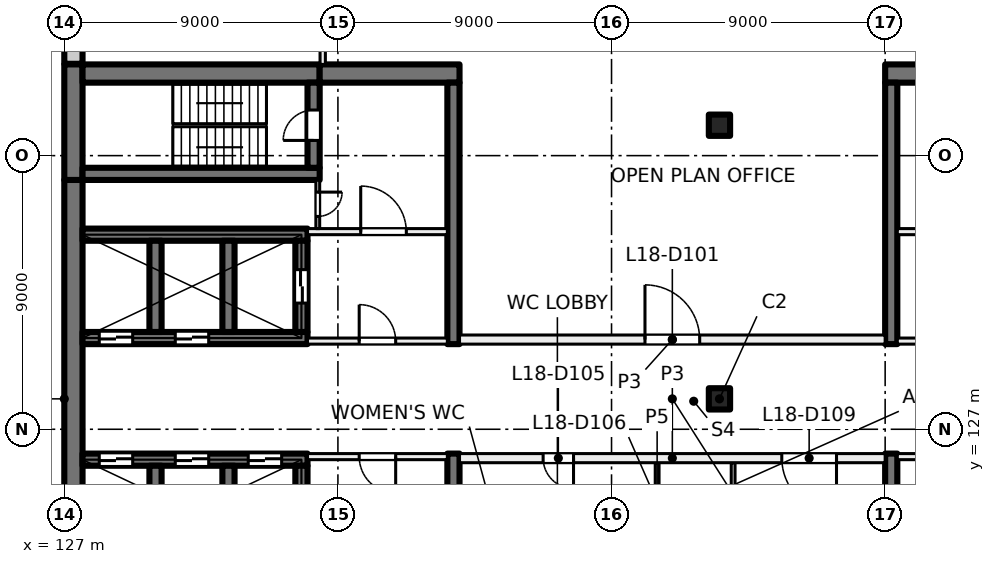
"""IFC4 building model, lengths in metres.
Left out: names, types, materials, properties, quantities, classifications, styles, units other than length and angle.
Written with IfcOpenShell. Run it as: python <this file> out.ifc"""

import sys

from ifc_helpers import new_model, si_unit, direction, frame, frame_2d, origin, origin_2d, place, context, subcontext, project, spatial, rectangle, extrude, element, fill, save


model = new_model("IFC4")
c1 = context("Model", 3, precision=1e-05, world=origin(), true_north=direction((0.0, 1.0)))
c2 = subcontext(c1, "Body", "Model", "MODEL_VIEW")
j1 = project(units=[si_unit("LENGTHUNIT", "METRE"), si_unit("PLANEANGLEUNIT", "RADIAN")], contexts=[c1])
p1 = place(None, origin())
s1 = spatial("IfcSite", under=j1, at=p1, CompositionType="ELEMENT")
p2 = place(p1, origin())
s2 = spatial("IfcBuilding", under=s1, at=p2, CompositionType="ELEMENT")
p3 = place(p2, frame((0.0, 0.0, 81.0)))
s3 = spatial("IfcBuildingStorey", under=s2, at=p3, CompositionType="ELEMENT", Elevation=81.0)
for number, where, z_axis, x_axis in (
    (1, (148.55, 128.0, 0.0), (0.0, 0.0, 1.0), (1.0, 0.0, 0.0)),
    (2, (148.55, 137.0, 0.0), (0.0, 0.0, 1.0), (1.0, 0.0, 0.0)),
):
    element("IfcColumn", number, at=place(p3, frame(where, z_axis=z_axis, x_axis=x_axis)), inside=s3, PredefinedType="COLUMN", context=c2, shape_type="SweptSolid", body=[
        extrude(rectangle(XDim=0.7, YDim=0.7, at=origin_2d()), origin(), (0.0, 0.0, 1.0), 4.0),
    ])
p4 = place(p3, frame((127.3, 120.8, 0.0), z_axis=(0.0, 0.0, 1.0), x_axis=(0.0, 1.0, 0.0)))
e3 = element("IfcWall", 3, at=p4, inside=s3, PredefinedType="SHEAR", context=c2, shape_type="SweptSolid", body=[
    extrude(rectangle(XDim=14.4, YDim=0.6, at=frame_2d((7.2, 0.0))), origin(), (0.0, 0.0, 1.0), 4.0),
])
p5 = place(p3, frame((127.3, 135.2, 0.0), z_axis=(0.0, 0.0, 1.0), x_axis=(0.0, 1.0, 0.0)))
e4 = element("IfcWall", 4, at=p5, inside=s3, PredefinedType="SHEAR", context=c2, shape_type="SweptSolid", body=[
    extrude(rectangle(XDim=3.8, YDim=0.6, at=frame_2d((1.9, 0.0))), origin(), (0.0, 0.0, 1.0), 4.0),
])
p6 = place(p3, frame((127.6, 138.7, 0.0), z_axis=(0.0, 0.0, 1.0), x_axis=(1.0, 0.0, 0.0)))
e5 = element("IfcWall", 5, at=p6, inside=s3, PredefinedType="SHEAR", context=c2, shape_type="SweptSolid", body=[
    extrude(rectangle(XDim=7.8, YDim=0.6, at=frame_2d((3.9, 0.0))), origin(), (0.0, 0.0, 1.0), 4.0),
])
p7 = place(p3, frame((135.4, 138.7, 0.0), z_axis=(0.0, 0.0, 1.0), x_axis=(1.0, 0.0, 0.0)))
e6 = element("IfcWall", 6, at=p7, inside=s3, PredefinedType="SHEAR", context=c2, shape_type="SweptSolid", body=[
    extrude(rectangle(XDim=4.6, YDim=0.6, at=frame_2d((2.3, 0.0))), origin(), (0.0, 0.0, 1.0), 4.0),
])
p8 = place(p3, frame((127.6, 135.4, 0.0), z_axis=(0.0, 0.0, 1.0), x_axis=(1.0, 0.0, 0.0)))
e7 = element("IfcWall", 7, at=p8, inside=s3, PredefinedType="SHEAR", context=c2, shape_type="SweptSolid", body=[
    extrude(rectangle(XDim=7.8, YDim=0.4, at=frame_2d((3.9, 0.0))), origin(), (0.0, 0.0, 1.0), 4.0),
])
p9 = place(p3, frame((135.2, 135.6, 0.0), z_axis=(0.0, 0.0, 1.0), x_axis=(0.0, 1.0, 0.0)))
e8 = element("IfcWall", 8, at=p9, inside=s3, PredefinedType="SHEAR", context=c2, shape_type="SweptSolid", body=[
    extrude(rectangle(XDim=2.8, YDim=0.4, at=frame_2d((1.4, 0.0))), origin(), (0.0, 0.0, 1.0), 4.0),
])
p10 = place(p9, frame((0.9, 0.0, 0.0)))
e9 = element("IfcOpeningElement", 9, at=p10, cuts=e8, PredefinedType="OPENING", context=c2, shape_type="SweptSolid", body=[
    extrude(rectangle(XDim=1.0, YDim=2.1, at=frame_2d((0.5, 1.05))), frame((0.0, 0.21, 0.0), z_axis=(0.0, -1.0, 0.0), x_axis=(1.0, 0.0, 0.0)), (0.0, 0.0, 1.0), 0.42),
])
p11 = place(p3, frame((127.6, 126.0, 0.0), z_axis=(0.0, 0.0, 1.0), x_axis=(1.0, 0.0, 0.0)))
e10 = element("IfcWall", 10, at=p11, inside=s3, PredefinedType="SHEAR", context=c2, shape_type="SweptSolid", body=[
    extrude(rectangle(XDim=7.4, YDim=0.4, at=frame_2d((3.7, 0.0))), origin(), (0.0, 0.0, 1.0), 4.0),
])
p12 = place(p11, frame((0.55, 0.0, 0.0)))
e11 = element("IfcOpeningElement", 11, at=p12, cuts=e10, PredefinedType="OPENING", context=c2, shape_type="SweptSolid", body=[
    extrude(rectangle(XDim=1.1, YDim=2.1, at=frame_2d((0.55, 1.05))), frame((0.0, 0.21, 0.0), z_axis=(0.0, -1.0, 0.0), x_axis=(1.0, 0.0, 0.0)), (0.0, 0.0, 1.0), 0.42),
])
p13 = place(p11, frame((3.05, 0.0, 0.0)))
e12 = element("IfcOpeningElement", 12, at=p13, cuts=e10, PredefinedType="OPENING", context=c2, shape_type="SweptSolid", body=[
    extrude(rectangle(XDim=1.1, YDim=2.1, at=frame_2d((0.55, 1.05))), frame((0.0, 0.21, 0.0), z_axis=(0.0, -1.0, 0.0), x_axis=(1.0, 0.0, 0.0)), (0.0, 0.0, 1.0), 0.42),
])
p14 = place(p11, frame((5.45, 0.0, 0.0)))
e13 = element("IfcOpeningElement", 13, at=p14, cuts=e10, PredefinedType="OPENING", context=c2, shape_type="SweptSolid", body=[
    extrude(rectangle(XDim=1.1, YDim=2.1, at=frame_2d((0.55, 1.05))), frame((0.0, 0.21, 0.0), z_axis=(0.0, -1.0, 0.0), x_axis=(1.0, 0.0, 0.0)), (0.0, 0.0, 1.0), 0.42),
])
for number, where, z_axis, x_axis in (
    (14, (130.0, 122.8, 0.0), (0.0, 0.0, 1.0), (0.0, 1.0, 0.0)),
    (15, (132.4, 122.8, 0.0), (0.0, 0.0, 1.0), (0.0, 1.0, 0.0)),
    (16, (134.8, 122.8, 0.0), (0.0, 0.0, 1.0), (0.0, 1.0, 0.0)),
):
    element("IfcWall", number, at=place(p3, frame(where, z_axis=z_axis, x_axis=x_axis)), inside=s3, PredefinedType="SHEAR", context=c2, shape_type="SweptSolid", body=[
        extrude(rectangle(XDim=3.0, YDim=0.4, at=frame_2d((1.5, 0.0))), origin(), (0.0, 0.0, 1.0), 4.0),
    ])
p15 = place(p3, frame((127.6, 130.0, 0.0), z_axis=(0.0, 0.0, 1.0), x_axis=(1.0, 0.0, 0.0)))
e17 = element("IfcWall", 17, at=p15, inside=s3, PredefinedType="SHEAR", context=c2, shape_type="SweptSolid", body=[
    extrude(rectangle(XDim=7.4, YDim=0.4, at=frame_2d((3.7, 0.0))), origin(), (0.0, 0.0, 1.0), 4.0),
])
p16 = place(p15, frame((0.55, 0.0, 0.0)))
e18 = element("IfcOpeningElement", 18, at=p16, cuts=e17, PredefinedType="OPENING", context=c2, shape_type="SweptSolid", body=[
    extrude(rectangle(XDim=1.1, YDim=2.1, at=frame_2d((0.55, 1.05))), frame((0.0, 0.21, 0.0), z_axis=(0.0, -1.0, 0.0), x_axis=(1.0, 0.0, 0.0)), (0.0, 0.0, 1.0), 0.42),
])
p17 = place(p15, frame((3.05, 0.0, 0.0)))
e19 = element("IfcOpeningElement", 19, at=p17, cuts=e17, PredefinedType="OPENING", context=c2, shape_type="SweptSolid", body=[
    extrude(rectangle(XDim=1.1, YDim=2.1, at=frame_2d((0.55, 1.05))), frame((0.0, 0.21, 0.0), z_axis=(0.0, -1.0, 0.0), x_axis=(1.0, 0.0, 0.0)), (0.0, 0.0, 1.0), 0.42),
])
p18 = place(p3, frame((127.6, 133.4, 0.0), z_axis=(0.0, 0.0, 1.0), x_axis=(1.0, 0.0, 0.0)))
e20 = element("IfcWall", 20, at=p18, inside=s3, PredefinedType="SHEAR", context=c2, shape_type="SweptSolid", body=[
    extrude(rectangle(XDim=7.4, YDim=0.4, at=frame_2d((3.7, 0.0))), origin(), (0.0, 0.0, 1.0), 4.0),
])
for number, where, z_axis, x_axis in (
    (21, (130.0, 130.2, 0.0), (0.0, 0.0, 1.0), (0.0, 1.0, 0.0)),
    (22, (132.4, 130.2, 0.0), (0.0, 0.0, 1.0), (0.0, 1.0, 0.0)),
):
    element("IfcWall", number, at=place(p3, frame(where, z_axis=z_axis, x_axis=x_axis)), inside=s3, PredefinedType="SHEAR", context=c2, shape_type="SweptSolid", body=[
        extrude(rectangle(XDim=3.0, YDim=0.4, at=frame_2d((1.5, 0.0))), origin(), (0.0, 0.0, 1.0), 4.0),
    ])
p19 = place(p3, frame((134.8, 130.2, 0.0), z_axis=(0.0, 0.0, 1.0), x_axis=(0.0, 1.0, 0.0)))
e23 = element("IfcWall", 23, at=p19, inside=s3, PredefinedType="SHEAR", context=c2, shape_type="SweptSolid", body=[
    extrude(rectangle(XDim=3.0, YDim=0.4, at=frame_2d((1.5, 0.0))), origin(), (0.0, 0.0, 1.0), 4.0),
])
p20 = place(p19, frame((0.95, 0.0, 0.0)))
e24 = element("IfcOpeningElement", 24, at=p20, cuts=e23, PredefinedType="OPENING", context=c2, shape_type="SweptSolid", body=[
    extrude(rectangle(XDim=1.1, YDim=2.1, at=frame_2d((0.55, 1.05))), frame((0.0, 0.21, 0.0), z_axis=(0.0, -1.0, 0.0), x_axis=(1.0, 0.0, 0.0)), (0.0, 0.0, 1.0), 0.42),
])
for number, where, z_axis, x_axis in (
    (25, (139.8, 117.6, 0.0), (0.0, 0.0, 1.0), (0.0, 1.0, 0.0)),
    (26, (139.8, 129.8, 0.0), (0.0, 0.0, 1.0), (0.0, 1.0, 0.0)),
):
    element("IfcWall", number, at=place(p3, frame(where, z_axis=z_axis, x_axis=x_axis)), inside=s3, PredefinedType="SHEAR", context=c2, shape_type="SweptSolid", body=[
        extrude(rectangle(XDim=8.6, YDim=0.4, at=frame_2d((4.3, 0.0))), origin(), (0.0, 0.0, 1.0), 4.0),
    ])
p21 = place(p3, frame((158.6, 138.7, 0.0), z_axis=(0.0, 0.0, 1.0), x_axis=(-1.0, 0.0, 0.0)))
e27 = element("IfcWall", 27, at=p21, inside=s3, PredefinedType="SHEAR", context=c2, shape_type="SweptSolid", body=[
    extrude(rectangle(XDim=4.6, YDim=0.6, at=frame_2d((2.3, 0.0))), origin(), (0.0, 0.0, 1.0), 4.0),
])
for number, where, z_axis, x_axis in (
    (28, (154.2, 138.4, 0.0), (0.0, 0.0, 1.0), (0.0, -1.0, 0.0)),
    (29, (154.2, 126.2, 0.0), (0.0, 0.0, 1.0), (0.0, -1.0, 0.0)),
):
    element("IfcWall", number, at=place(p3, frame(where, z_axis=z_axis, x_axis=x_axis)), inside=s3, PredefinedType="SHEAR", context=c2, shape_type="SweptSolid", body=[
        extrude(rectangle(XDim=8.6, YDim=0.4, at=frame_2d((4.3, 0.0))), origin(), (0.0, 0.0, 1.0), 4.0),
    ])
p22 = place(p3, frame((127.3, 139.02, 0.0), z_axis=(0.0, 0.0, 1.0), x_axis=(0.0, 1.0, 0.0)))
e30 = element("IfcWall", 30, at=p22, inside=s3, PredefinedType="SOLIDWALL", context=c2, shape_type="SweptSolid", body=[
    extrude(rectangle(XDim=2.98, YDim=0.6, at=frame_2d((1.49, 0.0))), origin(), (0.0, 0.0, 1.0), 3.625),
])
p23 = place(p3, frame((135.0, 129.9, 0.0), z_axis=(0.0, 0.0, 1.0), x_axis=(1.0, 0.0, 0.0)))
e31 = element("IfcWall", 31, at=p23, inside=s3, PredefinedType="PARTITIONING", context=c2, shape_type="SweptSolid", body=[
    extrude(rectangle(XDim=4.6, YDim=0.2, at=frame_2d((2.3, 0.0))), origin(), (0.0, 0.0, 1.0), 3.625),
])
p24 = place(p23, frame((1.7, 0.0, 0.0)))
e32 = element("IfcOpeningElement", 32, at=p24, cuts=e31, PredefinedType="OPENING", context=c2, shape_type="SweptSolid", body=[
    extrude(rectangle(XDim=1.2, YDim=2.1, at=frame_2d((0.6, 1.05))), frame((0.0, 0.11, 0.0), z_axis=(0.0, -1.0, 0.0), x_axis=(1.0, 0.0, 0.0)), (0.0, 0.0, 1.0), 0.22),
])
p25 = place(p3, frame((135.0, 133.5, 0.0), z_axis=(0.0, 0.0, 1.0), x_axis=(1.0, 0.0, 0.0)))
e33 = element("IfcWall", 33, at=p25, inside=s3, PredefinedType="PARTITIONING", context=c2, shape_type="SweptSolid", body=[
    extrude(rectangle(XDim=4.6, YDim=0.2, at=frame_2d((2.3, 0.0))), origin(), (0.0, 0.0, 1.0), 3.625),
])
p26 = place(p25, frame((1.75, 0.0, 0.0)))
e34 = element("IfcOpeningElement", 34, at=p26, cuts=e33, PredefinedType="OPENING", context=c2, shape_type="SweptSolid", body=[
    extrude(rectangle(XDim=1.5, YDim=2.1, at=frame_2d((0.75, 1.05))), frame((0.0, 0.11, 0.0), z_axis=(0.0, -1.0, 0.0), x_axis=(1.0, 0.0, 0.0)), (0.0, 0.0, 1.0), 0.22),
])
p27 = place(p3, frame((135.337, 135.2, 0.0), z_axis=(0.0, 0.0, 1.0), x_axis=(0.0, -1.0, 0.0)))
e35 = element("IfcWall", 35, at=p27, inside=s3, PredefinedType="PARTITIONING", context=c2, shape_type="SweptSolid", body=[
    extrude(rectangle(XDim=1.6, YDim=0.125, at=frame_2d((0.8, 0.0))), origin(), (0.0, 0.0, 1.0), 3.625),
])
p28 = place(p27, frame((0.4, 0.0, 0.0)))
e36 = element("IfcOpeningElement", 36, at=p28, cuts=e35, PredefinedType="OPENING", context=c2, shape_type="SweptSolid", body=[
    extrude(rectangle(XDim=0.8, YDim=2.1, at=frame_2d((0.4, 1.05))), frame((0.0, 0.073, 0.0), z_axis=(0.0, -1.0, 0.0), x_axis=(1.0, 0.0, 0.0)), (0.0, 0.0, 1.0), 0.145),
])
p29 = place(p3, frame((139.6, 126.1, 0.0), z_axis=(0.0, 0.0, 1.0), x_axis=(-1.0, 0.0, 0.0)))
e37 = element("IfcWall", 37, at=p29, inside=s3, PredefinedType="PARTITIONING", context=c2, shape_type="SweptSolid", body=[
    extrude(rectangle(XDim=4.6, YDim=0.2, at=frame_2d((2.3, 0.0))), origin(), (0.0, 0.0, 1.0), 3.625),
])
p30 = place(p29, frame((1.7, 0.0, 0.0)))
e38 = element("IfcOpeningElement", 38, at=p30, cuts=e37, PredefinedType="OPENING", context=c2, shape_type="SweptSolid", body=[
    extrude(rectangle(XDim=1.2, YDim=2.1, at=frame_2d((0.6, 1.05))), frame((0.0, 0.11, 0.0), z_axis=(0.0, -1.0, 0.0), x_axis=(1.0, 0.0, 0.0)), (0.0, 0.0, 1.0), 0.22),
])
p31 = place(p3, frame((163.8, 126.1, 0.0), z_axis=(0.0, 0.0, 1.0), x_axis=(-1.0, 0.0, 0.0)))
e39 = element("IfcWall", 39, at=p31, inside=s3, PredefinedType="PARTITIONING", context=c2, shape_type="SweptSolid", body=[
    extrude(rectangle(XDim=9.4, YDim=0.2, at=frame_2d((4.7, 0.0))), origin(), (0.0, 0.0, 1.0), 3.625),
])
p32 = place(p31, frame((4.1, 0.0, 0.0)))
e40 = element("IfcOpeningElement", 40, at=p32, cuts=e39, PredefinedType="OPENING", context=c2, shape_type="SweptSolid", body=[
    extrude(rectangle(XDim=1.2, YDim=2.1, at=frame_2d((0.6, 1.05))), frame((0.0, 0.11, 0.0), z_axis=(0.0, -1.0, 0.0), x_axis=(1.0, 0.0, 0.0)), (0.0, 0.0, 1.0), 0.22),
])
p33 = place(p3, frame((154.4, 129.9, 0.0), z_axis=(0.0, 0.0, 1.0), x_axis=(1.0, 0.0, 0.0)))
e41 = element("IfcWall", 41, at=p33, inside=s3, PredefinedType="PARTITIONING", context=c2, shape_type="SweptSolid", body=[
    extrude(rectangle(XDim=9.4, YDim=0.2, at=frame_2d((4.7, 0.0))), origin(), (0.0, 0.0, 1.0), 3.625),
])
p34 = place(p33, frame((4.1, 0.0, 0.0)))
e42 = element("IfcOpeningElement", 42, at=p34, cuts=e41, PredefinedType="OPENING", context=c2, shape_type="SweptSolid", body=[
    extrude(rectangle(XDim=1.2, YDim=2.1, at=frame_2d((0.6, 1.05))), frame((0.0, 0.11, 0.0), z_axis=(0.0, -1.0, 0.0), x_axis=(1.0, 0.0, 0.0)), (0.0, 0.0, 1.0), 0.22),
])
p35 = place(p3, frame((154.4, 133.5, 0.0), z_axis=(0.0, 0.0, 1.0), x_axis=(1.0, 0.0, 0.0)))
e43 = element("IfcWall", 43, at=p35, inside=s3, PredefinedType="PARTITIONING", context=c2, shape_type="SweptSolid", body=[
    extrude(rectangle(XDim=9.4, YDim=0.2, at=frame_2d((4.7, 0.0))), origin(), (0.0, 0.0, 1.0), 3.625),
])
p36 = place(p35, frame((1.35, 0.0, 0.0)))
e44 = element("IfcOpeningElement", 44, at=p36, cuts=e43, PredefinedType="OPENING", context=c2, shape_type="SweptSolid", body=[
    extrude(rectangle(XDim=1.5, YDim=2.1, at=frame_2d((0.75, 1.05))), frame((0.0, 0.11, 0.0), z_axis=(0.0, -1.0, 0.0), x_axis=(1.0, 0.0, 0.0)), (0.0, 0.0, 1.0), 0.22),
])
p37 = place(p3, frame((135.5, 145.4, 0.0), z_axis=(0.0, 0.0, 1.0), x_axis=(0.0, -1.0, 0.0)))
e45 = element("IfcWall", 45, at=p37, inside=s3, PredefinedType="PARTITIONING", context=c2, shape_type="SweptSolid", body=[
    extrude(rectangle(XDim=6.4, YDim=0.175, at=frame_2d((3.2, 0.0))), origin(), (0.0, 0.0, 1.0), 3.625),
])
p38 = place(p37, frame((2.6, 0.0, 0.0)))
e46 = element("IfcOpeningElement", 46, at=p38, cuts=e45, PredefinedType="OPENING", context=c2, shape_type="SweptSolid", body=[
    extrude(rectangle(XDim=1.2, YDim=2.1, at=frame_2d((0.6, 1.05))), frame((0.0, 0.097, 0.0), z_axis=(0.0, -1.0, 0.0), x_axis=(1.0, 0.0, 0.0)), (0.0, 0.0, 1.0), 0.195),
])
p39 = place(p3, frame((140.0, 129.95, 0.0), z_axis=(0.0, 0.0, 1.0), x_axis=(1.0, 0.0, 0.0)))
e47 = element("IfcWall", 47, at=p39, inside=s3, PredefinedType="PARTITIONING", context=c2, shape_type="SweptSolid", body=[
    extrude(rectangle(XDim=14.0, YDim=0.3, at=frame_2d((7.0, 0.0))), origin(), (0.0, 0.0, 1.0), 3.625),
])
p40 = place(p39, frame((6.1, 0.0, 0.0)))
e48 = element("IfcOpeningElement", 48, at=p40, cuts=e47, PredefinedType="OPENING", context=c2, shape_type="SweptSolid", body=[
    extrude(rectangle(XDim=1.8, YDim=2.1, at=frame_2d((0.9, 1.05))), frame((0.0, 0.16, 0.0), z_axis=(0.0, -1.0, 0.0), x_axis=(1.0, 0.0, 0.0)), (0.0, 0.0, 1.0), 0.32),
])
p41 = place(p3, frame((146.5, 125.9, 0.0), z_axis=(0.0, 0.0, 1.0), x_axis=(0.0, -1.0, 0.0)))
e49 = element("IfcWall", 49, at=p41, inside=s3, PredefinedType="PARTITIONING", context=c2, shape_type="SweptSolid", body=[
    extrude(rectangle(XDim=2.588, YDim=0.125, at=frame_2d((1.294, 0.0))), origin(), (0.0, 0.0, 1.0), 3.625),
])
p42 = place(p41, frame((0.794, 0.0, 0.0)))
e50 = element("IfcOpeningElement", 50, at=p42, cuts=e49, PredefinedType="OPENING", context=c2, shape_type="SweptSolid", body=[
    extrude(rectangle(XDim=1.0, YDim=2.1, at=frame_2d((0.5, 1.05))), frame((0.0, 0.073, 0.0), z_axis=(0.0, -1.0, 0.0), x_axis=(1.0, 0.0, 0.0)), (0.0, 0.0, 1.0), 0.145),
])
p43 = place(p3, frame((149.0, 116.988, 0.0), z_axis=(0.0, 0.0, 1.0), x_axis=(0.0, 1.0, 0.0)))
e51 = element("IfcWall", 51, at=p43, inside=s3, PredefinedType="PARTITIONING", context=c2, shape_type="SweptSolid", body=[
    extrude(rectangle(XDim=8.912, YDim=0.125, at=frame_2d((4.456, 0.0))), origin(), (0.0, 0.0, 1.0), 3.625),
])
p44 = place(p3, frame((154.0, 126.05, 0.0), z_axis=(0.0, 0.0, 1.0), x_axis=(-1.0, 0.0, 0.0)))
e52 = element("IfcWall", 52, at=p44, inside=s3, PredefinedType="PARTITIONING", context=c2, shape_type="SweptSolid", body=[
    extrude(rectangle(XDim=14.0, YDim=0.3, at=frame_2d((7.0, 0.0))), origin(), (0.0, 0.0, 1.0), 3.625),
])
p45 = place(p44, frame((10.25, 0.0, 0.0)))
e53 = element("IfcOpeningElement", 53, at=p45, cuts=e52, PredefinedType="OPENING", context=c2, shape_type="SweptSolid", body=[
    extrude(rectangle(XDim=1.0, YDim=2.1, at=frame_2d((0.5, 1.05))), frame((0.0, 0.16, 0.0), z_axis=(0.0, -1.0, 0.0), x_axis=(1.0, 0.0, 0.0)), (0.0, 0.0, 1.0), 0.32),
])
p46 = place(p44, frame((1.6, 0.0, 0.0)))
e54 = element("IfcOpeningElement", 54, at=p46, cuts=e52, PredefinedType="OPENING", context=c2, shape_type="SweptSolid", body=[
    extrude(rectangle(XDim=1.8, YDim=2.1, at=frame_2d((0.9, 1.05))), frame((0.0, 0.16, 0.0), z_axis=(0.0, -1.0, 0.0), x_axis=(1.0, 0.0, 0.0)), (0.0, 0.0, 1.0), 0.32),
])
p47 = place(p16, origin())
e55 = element("IfcDoor", 55, at=p47, inside=s3, OperationType="DOUBLE_DOOR_SLIDING", PredefinedType="DOOR", context=c2, shape_type="SweptSolid", body=[
    extrude(rectangle(XDim=1.1, YDim=2.1, at=frame_2d((0.55, 1.05))), frame((0.0, 0.025, 0.0), z_axis=(0.0, -1.0, 0.0), x_axis=(1.0, 0.0, 0.0)), (0.0, 0.0, 1.0), 0.05),
])
fill(e18, e55)
p48 = place(p17, origin())
e56 = element("IfcDoor", 56, at=p48, inside=s3, OperationType="DOUBLE_DOOR_SLIDING", PredefinedType="DOOR", context=c2, shape_type="SweptSolid", body=[
    extrude(rectangle(XDim=1.1, YDim=2.1, at=frame_2d((0.55, 1.05))), frame((0.0, 0.025, 0.0), z_axis=(0.0, -1.0, 0.0), x_axis=(1.0, 0.0, 0.0)), (0.0, 0.0, 1.0), 0.05),
])
fill(e19, e56)
p49 = place(p12, origin())
e57 = element("IfcDoor", 57, at=p49, inside=s3, OperationType="DOUBLE_DOOR_SLIDING", PredefinedType="DOOR", context=c2, shape_type="SweptSolid", body=[
    extrude(rectangle(XDim=1.1, YDim=2.1, at=frame_2d((0.55, 1.05))), frame((0.0, 0.025, 0.0), z_axis=(0.0, -1.0, 0.0), x_axis=(1.0, 0.0, 0.0)), (0.0, 0.0, 1.0), 0.05),
])
fill(e11, e57)
p50 = place(p13, origin())
e58 = element("IfcDoor", 58, at=p50, inside=s3, OperationType="DOUBLE_DOOR_SLIDING", PredefinedType="DOOR", context=c2, shape_type="SweptSolid", body=[
    extrude(rectangle(XDim=1.1, YDim=2.1, at=frame_2d((0.55, 1.05))), frame((0.0, 0.025, 0.0), z_axis=(0.0, -1.0, 0.0), x_axis=(1.0, 0.0, 0.0)), (0.0, 0.0, 1.0), 0.05),
])
fill(e12, e58)
p51 = place(p14, origin())
e59 = element("IfcDoor", 59, at=p51, inside=s3, OperationType="DOUBLE_DOOR_SLIDING", PredefinedType="DOOR", context=c2, shape_type="SweptSolid", body=[
    extrude(rectangle(XDim=1.1, YDim=2.1, at=frame_2d((0.55, 1.05))), frame((0.0, 0.025, 0.0), z_axis=(0.0, -1.0, 0.0), x_axis=(1.0, 0.0, 0.0)), (0.0, 0.0, 1.0), 0.05),
])
fill(e13, e59)
p52 = place(p24, origin())
e60 = element("IfcDoor", 60, at=p52, inside=s3, OperationType="DOUBLE_DOOR_SINGLE_SWING", PredefinedType="DOOR", context=c2, shape_type="SweptSolid", body=[
    extrude(rectangle(XDim=1.2, YDim=2.1, at=frame_2d((0.6, 1.05))), frame((0.0, 0.025, 0.0), z_axis=(0.0, -1.0, 0.0), x_axis=(1.0, 0.0, 0.0)), (0.0, 0.0, 1.0), 0.05),
])
fill(e32, e60)
p53 = place(p26, origin())
e61 = element("IfcDoor", 61, at=p53, inside=s3, OperationType="DOUBLE_DOOR_SINGLE_SWING", PredefinedType="DOOR", context=c2, shape_type="SweptSolid", body=[
    extrude(rectangle(XDim=1.5, YDim=2.1, at=frame_2d((0.75, 1.05))), frame((0.0, 0.025, 0.0), z_axis=(0.0, -1.0, 0.0), x_axis=(1.0, 0.0, 0.0)), (0.0, 0.0, 1.0), 0.05),
])
fill(e34, e61)
p54 = place(p10, origin())
e62 = element("IfcDoor", 62, at=p54, inside=s3, OperationType="SINGLE_SWING_LEFT", PredefinedType="DOOR", context=c2, shape_type="SweptSolid", body=[
    extrude(rectangle(XDim=1.0, YDim=2.1, at=frame_2d((0.5, 1.05))), frame((0.0, 0.025, 0.0), z_axis=(0.0, -1.0, 0.0), x_axis=(1.0, 0.0, 0.0)), (0.0, 0.0, 1.0), 0.05),
])
fill(e9, e62)
p55 = place(p28, origin())
e63 = element("IfcDoor", 63, at=p55, inside=s3, OperationType="SINGLE_SWING_RIGHT", PredefinedType="DOOR", context=c2, shape_type="SweptSolid", body=[
    extrude(rectangle(XDim=0.8, YDim=2.1, at=frame_2d((0.4, 1.05))), frame((0.0, 0.025, 0.0), z_axis=(0.0, -1.0, 0.0), x_axis=(1.0, 0.0, 0.0)), (0.0, 0.0, 1.0), 0.05),
])
fill(e36, e63)
p56 = place(p30, origin())
e64 = element("IfcDoor", 64, at=p56, inside=s3, OperationType="DOUBLE_DOOR_SINGLE_SWING", PredefinedType="DOOR", context=c2, shape_type="SweptSolid", body=[
    extrude(rectangle(XDim=1.2, YDim=2.1, at=frame_2d((0.6, 1.05))), frame((0.0, 0.025, 0.0), z_axis=(0.0, -1.0, 0.0), x_axis=(1.0, 0.0, 0.0)), (0.0, 0.0, 1.0), 0.05),
])
fill(e38, e64)
p57 = place(p20, origin())
e65 = element("IfcDoor", 65, at=p57, inside=s3, OperationType="DOUBLE_DOOR_SLIDING", PredefinedType="DOOR", context=c2, shape_type="SweptSolid", body=[
    extrude(rectangle(XDim=1.1, YDim=2.1, at=frame_2d((0.55, 1.05))), frame((0.0, 0.025, 0.0), z_axis=(0.0, -1.0, 0.0), x_axis=(1.0, 0.0, 0.0)), (0.0, 0.0, 1.0), 0.05),
])
fill(e24, e65)
p58 = place(p40, origin())
e66 = element("IfcDoor", 66, at=p58, inside=s3, OperationType="DOUBLE_DOOR_SINGLE_SWING", PredefinedType="DOOR", context=c2, shape_type="SweptSolid", body=[
    extrude(rectangle(XDim=1.8, YDim=2.1, at=frame_2d((0.9, 1.05))), frame((0.0, 0.025, 0.0), z_axis=(0.0, -1.0, 0.0), x_axis=(1.0, 0.0, 0.0)), (0.0, 0.0, 1.0), 0.05),
])
fill(e48, e66)
p59 = place(p45, origin())
e67 = element("IfcDoor", 67, at=p59, inside=s3, OperationType="SINGLE_SWING_RIGHT", PredefinedType="DOOR", context=c2, shape_type="SweptSolid", body=[
    extrude(rectangle(XDim=1.0, YDim=2.1, at=frame_2d((0.5, 1.05))), frame((0.0, 0.025, 0.0), z_axis=(0.0, -1.0, 0.0), x_axis=(1.0, 0.0, 0.0)), (0.0, 0.0, 1.0), 0.05),
])
fill(e53, e67)
p60 = place(p46, origin())
e68 = element("IfcDoor", 68, at=p60, inside=s3, OperationType="DOUBLE_DOOR_SINGLE_SWING", PredefinedType="DOOR", context=c2, shape_type="SweptSolid", body=[
    extrude(rectangle(XDim=1.8, YDim=2.1, at=frame_2d((0.9, 1.05))), frame((0.0, 0.025, 0.0), z_axis=(0.0, -1.0, 0.0), x_axis=(1.0, 0.0, 0.0)), (0.0, 0.0, 1.0), 0.05),
])
fill(e54, e68)
save(model, sys.argv[1])
